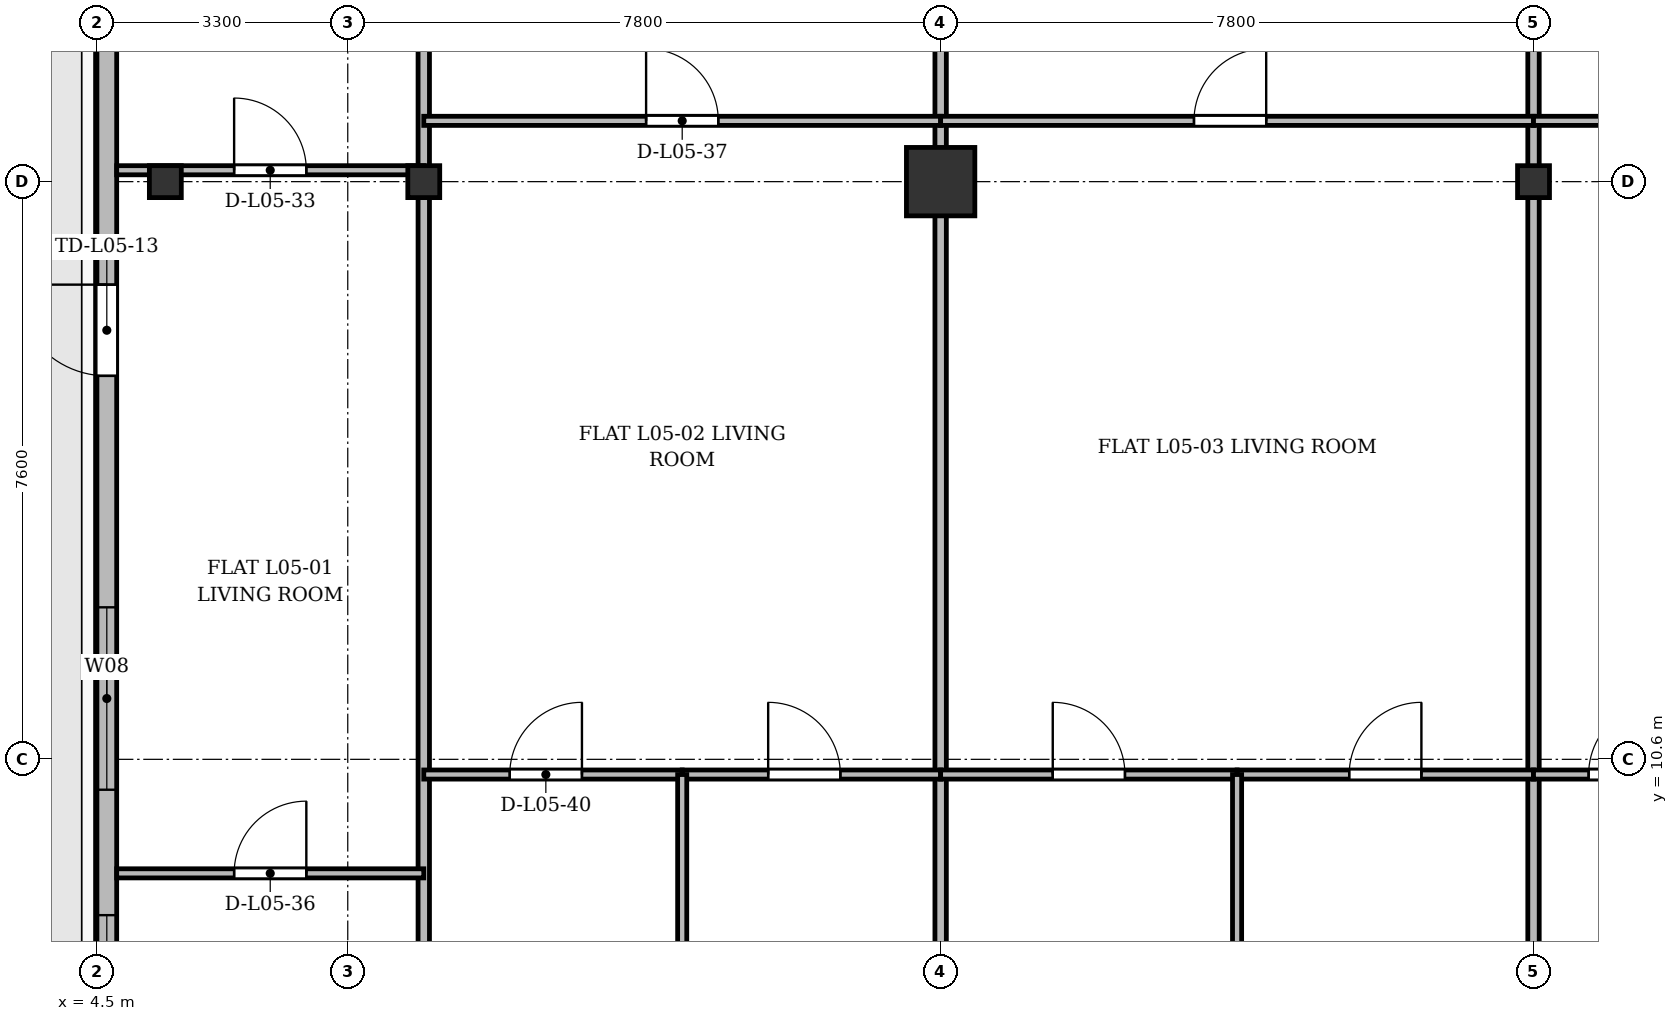
"""IFC4 building model, lengths in metres.
Left out: names, types, materials, properties, quantities, classifications, styles, units other than length and angle.
Written with IfcOpenShell. Run it as: python <this file> out.ifc"""

import sys

from ifc_helpers import new_model, si_unit, direction, frame, frame_2d, origin, origin_2d, place, context, subcontext, project, spatial, rectangle, i_section, extrude, source, transform, mapped, element, fill, save


model = new_model("IFC4")
c1 = context("Model", 3, precision=1e-05, world=origin(), true_north=direction((0.0, 1.0)))
c2 = subcontext(c1, "Body", "Model", "MODEL_VIEW")
j1 = project(units=[si_unit("LENGTHUNIT", "METRE"), si_unit("PLANEANGLEUNIT", "RADIAN")], contexts=[c1])
p1 = place(None, origin())
s1 = spatial("IfcSite", under=j1, at=p1, CompositionType="ELEMENT")
p2 = place(p1, origin())
s2 = spatial("IfcBuilding", under=s1, at=p2, CompositionType="ELEMENT")
p3 = place(p2, frame((0.0, 0.0, 23.5)))
s3 = spatial("IfcBuildingStorey", under=s2, at=p3, CompositionType="ELEMENT", Elevation=23.5)
m1 = source(origin(), c2, "Body", "SweptSolid", [
    extrude(i_section(OverallWidth=0.42, OverallDepth=0.42, WebThickness=0.026, FlangeThickness=0.04, at=origin_2d()), origin(), (0.0, 0.0, 1.0), 3.6),
])
for number, where, z_axis, x_axis in (
    (1, (5.4, 18.2, 0.0), (0.0, 0.0, 1.0), (1.0, 0.0, 0.0)),
    (2, (8.8, 18.2, 0.0), (0.0, 0.0, 1.0), (1.0, 0.0, 0.0)),
):
    element("IfcColumn", number, at=place(p3, frame(where, z_axis=z_axis, x_axis=x_axis)), inside=s3, PredefinedType="COLUMN", context=c2, shape_type="MappedRepresentation", body=[
        mapped(m1, transform((0.0, 0.0, 0.0), x_axis=(1.0, 0.0, 0.0), y_axis=(0.0, 1.0, 0.0), z_axis=(0.0, 0.0, 1.0), scale=1.0)),
    ])
m2 = source(origin(), c2, "Body", "SweptSolid", [
    extrude(rectangle(XDim=0.9, YDim=0.9, at=origin_2d()), origin(), (0.0, 0.0, 1.0), 3.6),
])
p4 = place(p3, frame((15.6, 18.2, 0.0), z_axis=(0.0, 0.0, 1.0), x_axis=(1.0, 0.0, 0.0)))
e3 = element("IfcColumn", 3, at=p4, inside=s3, PredefinedType="COLUMN", context=c2, shape_type="MappedRepresentation", body=[
    mapped(m2, transform((0.0, 0.0, 0.0), x_axis=(1.0, 0.0, 0.0), y_axis=(0.0, 1.0, 0.0), z_axis=(0.0, 0.0, 1.0), scale=1.0)),
])
p5 = place(p3, frame((23.4, 18.2, 0.0), z_axis=(0.0, 0.0, 1.0), x_axis=(1.0, 0.0, 0.0)))
e4 = element("IfcColumn", 4, at=p5, inside=s3, PredefinedType="COLUMN", context=c2, shape_type="MappedRepresentation", body=[
    mapped(m1, transform((0.0, 0.0, 0.0), x_axis=(1.0, 0.0, 0.0), y_axis=(0.0, 1.0, 0.0), z_axis=(0.0, 0.0, 1.0), scale=1.0)),
])
p6 = place(p3, frame((4.63, 5.9, 0.0), z_axis=(0.0, 0.0, 1.0), x_axis=(0.0, 1.0, 0.0)))
e5 = element("IfcWall", 5, at=p6, inside=s3, PredefinedType="SOLIDWALL", context=c2, shape_type="SweptSolid", body=[
    extrude(rectangle(XDim=39.6, YDim=0.26, at=frame_2d((19.8, 0.0))), origin(), (0.0, 0.0, 1.0), 3.34),
])
p7 = place(p6, frame((9.745, 0.0, 0.0)))
e6 = element("IfcOpeningElement", 6, at=p7, cuts=e5, PredefinedType="OPENING", context=c2, shape_type="SweptSolid", body=[
    extrude(rectangle(XDim=1.2, YDim=2.2, at=frame_2d((0.6, 1.1))), frame((0.0, 0.14, 0.0), z_axis=(0.0, -1.0, 0.0), x_axis=(1.0, 0.0, 0.0)), (0.0, 0.0, 1.0), 0.28),
])
p8 = place(p6, frame((1.45, 0.0, 0.92)))
e7 = element("IfcOpeningElement", 7, at=p8, cuts=e5, PredefinedType="OPENING", context=c2, shape_type="SweptSolid", body=[
    extrude(rectangle(XDim=1.2, YDim=1.65, at=frame_2d((0.6, 0.825))), frame((0.0, 0.14, 0.0), z_axis=(0.0, -1.0, 0.0), x_axis=(1.0, 0.0, 0.0)), (0.0, 0.0, 1.0), 0.28),
])
p9 = place(p6, frame((4.3, 0.0, 0.92)))
e8 = element("IfcOpeningElement", 8, at=p9, cuts=e5, PredefinedType="OPENING", context=c2, shape_type="SweptSolid", body=[
    extrude(rectangle(XDim=2.4, YDim=2.1, at=frame_2d((1.2, 1.05))), frame((0.0, 0.14, 0.0), z_axis=(0.0, -1.0, 0.0), x_axis=(1.0, 0.0, 0.0)), (0.0, 0.0, 1.0), 0.28),
])
p10 = place(p6, frame((33.9, 0.0, 0.92)))
e9 = element("IfcOpeningElement", 9, at=p10, cuts=e5, PredefinedType="OPENING", context=c2, shape_type="SweptSolid", body=[
    extrude(rectangle(XDim=1.2, YDim=1.65, at=frame_2d((0.6, 0.825))), frame((0.0, 0.14, 0.0), z_axis=(0.0, -1.0, 0.0), x_axis=(1.0, 0.0, 0.0)), (0.0, 0.0, 1.0), 0.28),
])
p11 = place(p6, frame((37.25, 0.0, 0.92)))
e10 = element("IfcOpeningElement", 10, at=p11, cuts=e5, PredefinedType="OPENING", context=c2, shape_type="SweptSolid", body=[
    extrude(rectangle(XDim=1.2, YDim=1.65, at=frame_2d((0.6, 0.825))), frame((0.0, 0.14, 0.0), z_axis=(0.0, -1.0, 0.0), x_axis=(1.0, 0.0, 0.0)), (0.0, 0.0, 1.0), 0.28),
])
for number, where, z_axis, x_axis in (
    (11, (8.8, 3.145, 0.0), (0.0, 0.0, 1.0), (0.0, 1.0, 0.0)),
    (12, (15.6, 3.145, 0.0), (0.0, 0.0, 1.0), (0.0, 1.0, 0.0)),
    (13, (23.4, 3.145, 0.0), (0.0, 0.0, 1.0), (0.0, 1.0, 0.0)),
):
    element("IfcWall", number, at=place(p3, frame(where, z_axis=z_axis, x_axis=x_axis)), inside=s3, PredefinedType="PARTITIONING", context=c2, shape_type="SweptSolid", body=[
        extrude(rectangle(XDim=24.455, YDim=0.15, at=frame_2d((12.228, 0.0))), origin(), (0.0, 0.0, 1.0), 2.752),
    ])
p12 = place(p3, frame((4.76, 18.35, 0.0), z_axis=(0.0, 0.0, 1.0), x_axis=(1.0, 0.0, 0.0)))
e14 = element("IfcWall", 14, at=p12, inside=s3, PredefinedType="PARTITIONING", context=c2, shape_type="SweptSolid", body=[
    extrude(rectangle(XDim=4.04, YDim=0.12, at=frame_2d((2.02, 0.0))), origin(), (0.0, 0.0, 1.0), 2.69),
])
p13 = place(p12, frame((1.545, 0.0, 0.0)))
e15 = element("IfcOpeningElement", 15, at=p13, cuts=e14, PredefinedType="OPENING", context=c2, shape_type="SweptSolid", body=[
    extrude(rectangle(XDim=0.95, YDim=2.15, at=frame_2d((0.475, 1.075))), frame((0.0, 0.07, 0.0), z_axis=(0.0, -1.0, 0.0), x_axis=(1.0, 0.0, 0.0)), (0.0, 0.0, 1.0), 0.14),
])
p14 = place(p3, frame((4.76, 9.1, 0.0), z_axis=(0.0, 0.0, 1.0), x_axis=(1.0, 0.0, 0.0)))
e16 = element("IfcWall", 16, at=p14, inside=s3, PredefinedType="PARTITIONING", context=c2, shape_type="SweptSolid", body=[
    extrude(rectangle(XDim=4.04, YDim=0.12, at=frame_2d((2.02, 0.0))), origin(), (0.0, 0.0, 1.0), 2.752),
])
p15 = place(p14, frame((1.545, 0.0, 0.0)))
e17 = element("IfcOpeningElement", 17, at=p15, cuts=e16, PredefinedType="OPENING", context=c2, shape_type="SweptSolid", body=[
    extrude(rectangle(XDim=0.95, YDim=2.15, at=frame_2d((0.475, 1.075))), frame((0.0, 0.07, 0.0), z_axis=(0.0, -1.0, 0.0), x_axis=(1.0, 0.0, 0.0)), (0.0, 0.0, 1.0), 0.14),
])
p16 = place(p3, frame((8.8, 19.0, 0.0), z_axis=(0.0, 0.0, 1.0), x_axis=(1.0, 0.0, 0.0)))
e18 = element("IfcWall", 18, at=p16, inside=s3, PredefinedType="PARTITIONING", context=c2, shape_type="SweptSolid", body=[
    extrude(rectangle(XDim=6.8, YDim=0.12, at=frame_2d((3.4, 0.0))), origin(), (0.0, 0.0, 1.0), 2.752),
])
p17 = place(p16, frame((2.925, 0.0, 0.0)))
e19 = element("IfcOpeningElement", 19, at=p17, cuts=e18, PredefinedType="OPENING", context=c2, shape_type="SweptSolid", body=[
    extrude(rectangle(XDim=0.95, YDim=2.15, at=frame_2d((0.475, 1.075))), frame((0.0, 0.07, 0.0), z_axis=(0.0, -1.0, 0.0), x_axis=(1.0, 0.0, 0.0)), (0.0, 0.0, 1.0), 0.14),
])
p18 = place(p3, frame((8.8, 10.4, 0.0), z_axis=(0.0, 0.0, 1.0), x_axis=(1.0, 0.0, 0.0)))
e20 = element("IfcWall", 20, at=p18, inside=s3, PredefinedType="PARTITIONING", context=c2, shape_type="SweptSolid", body=[
    extrude(rectangle(XDim=3.4, YDim=0.12, at=frame_2d((1.7, 0.0))), origin(), (0.0, 0.0, 1.0), 2.752),
])
p19 = place(p18, frame((1.131, 0.0, 0.0)))
e21 = element("IfcOpeningElement", 21, at=p19, cuts=e20, PredefinedType="OPENING", context=c2, shape_type="SweptSolid", body=[
    extrude(rectangle(XDim=0.95, YDim=2.15, at=frame_2d((0.475, 1.075))), frame((0.0, 0.07, 0.0), z_axis=(0.0, -1.0, 0.0), x_axis=(1.0, 0.0, 0.0)), (0.0, 0.0, 1.0), 0.14),
])
p20 = place(p3, frame((12.2, 10.4, 0.0), z_axis=(0.0, 0.0, 1.0), x_axis=(1.0, 0.0, 0.0)))
e22 = element("IfcWall", 22, at=p20, inside=s3, PredefinedType="PARTITIONING", context=c2, shape_type="SweptSolid", body=[
    extrude(rectangle(XDim=3.4, YDim=0.12, at=frame_2d((1.7, 0.0))), origin(), (0.0, 0.0, 1.0), 2.752),
])
p21 = place(p20, frame((1.131, 0.0, 0.0)))
e23 = element("IfcOpeningElement", 23, at=p21, cuts=e22, PredefinedType="OPENING", context=c2, shape_type="SweptSolid", body=[
    extrude(rectangle(XDim=0.95, YDim=2.15, at=frame_2d((0.475, 1.075))), frame((0.0, 0.07, 0.0), z_axis=(0.0, -1.0, 0.0), x_axis=(1.0, 0.0, 0.0)), (0.0, 0.0, 1.0), 0.14),
])
p22 = place(p3, frame((12.2, 3.145, 0.0), z_axis=(0.0, 0.0, 1.0), x_axis=(0.0, 1.0, 0.0)))
e24 = element("IfcWall", 24, at=p22, inside=s3, PredefinedType="PARTITIONING", context=c2, shape_type="SweptSolid", body=[
    extrude(rectangle(XDim=7.255, YDim=0.12, at=frame_2d((3.627, 0.0))), origin(), (0.0, 0.0, 1.0), 2.69),
])
p23 = place(p3, frame((15.6, 19.0, 0.0), z_axis=(0.0, 0.0, 1.0), x_axis=(1.0, 0.0, 0.0)))
e25 = element("IfcWall", 25, at=p23, inside=s3, PredefinedType="PARTITIONING", context=c2, shape_type="SweptSolid", body=[
    extrude(rectangle(XDim=7.8, YDim=0.12, at=frame_2d((3.9, 0.0))), origin(), (0.0, 0.0, 1.0), 2.752),
])
p24 = place(p23, frame((3.333, 0.0, 0.0)))
e26 = element("IfcOpeningElement", 26, at=p24, cuts=e25, PredefinedType="OPENING", context=c2, shape_type="SweptSolid", body=[
    extrude(rectangle(XDim=0.95, YDim=2.15, at=frame_2d((0.475, 1.075))), frame((0.0, 0.07, 0.0), z_axis=(0.0, -1.0, 0.0), x_axis=(1.0, 0.0, 0.0)), (0.0, 0.0, 1.0), 0.14),
])
p25 = place(p3, frame((15.6, 10.4, 0.0), z_axis=(0.0, 0.0, 1.0), x_axis=(1.0, 0.0, 0.0)))
e27 = element("IfcWall", 27, at=p25, inside=s3, PredefinedType="PARTITIONING", context=c2, shape_type="SweptSolid", body=[
    extrude(rectangle(XDim=3.9, YDim=0.12, at=frame_2d((1.95, 0.0))), origin(), (0.0, 0.0, 1.0), 2.752),
])
p26 = place(p25, frame((1.475, 0.0, 0.0)))
e28 = element("IfcOpeningElement", 28, at=p26, cuts=e27, PredefinedType="OPENING", context=c2, shape_type="SweptSolid", body=[
    extrude(rectangle(XDim=0.95, YDim=2.15, at=frame_2d((0.475, 1.075))), frame((0.0, 0.07, 0.0), z_axis=(0.0, -1.0, 0.0), x_axis=(1.0, 0.0, 0.0)), (0.0, 0.0, 1.0), 0.14),
])
p27 = place(p3, frame((19.5, 10.4, 0.0), z_axis=(0.0, 0.0, 1.0), x_axis=(1.0, 0.0, 0.0)))
e29 = element("IfcWall", 29, at=p27, inside=s3, PredefinedType="PARTITIONING", context=c2, shape_type="SweptSolid", body=[
    extrude(rectangle(XDim=3.9, YDim=0.12, at=frame_2d((1.95, 0.0))), origin(), (0.0, 0.0, 1.0), 2.752),
])
p28 = place(p27, frame((1.475, 0.0, 0.0)))
e30 = element("IfcOpeningElement", 30, at=p28, cuts=e29, PredefinedType="OPENING", context=c2, shape_type="SweptSolid", body=[
    extrude(rectangle(XDim=0.95, YDim=2.15, at=frame_2d((0.475, 1.075))), frame((0.0, 0.07, 0.0), z_axis=(0.0, -1.0, 0.0), x_axis=(1.0, 0.0, 0.0)), (0.0, 0.0, 1.0), 0.14),
])
p29 = place(p3, frame((19.5, 3.145, 0.0), z_axis=(0.0, 0.0, 1.0), x_axis=(0.0, 1.0, 0.0)))
e31 = element("IfcWall", 31, at=p29, inside=s3, PredefinedType="PARTITIONING", context=c2, shape_type="SweptSolid", body=[
    extrude(rectangle(XDim=7.255, YDim=0.12, at=frame_2d((3.627, 0.0))), origin(), (0.0, 0.0, 1.0), 2.69),
])
p30 = place(p3, frame((23.4, 19.0, 0.0), z_axis=(0.0, 0.0, 1.0), x_axis=(1.0, 0.0, 0.0)))
e32 = element("IfcWall", 32, at=p30, inside=s3, PredefinedType="PARTITIONING", context=c2, shape_type="SweptSolid", body=[
    extrude(rectangle(XDim=7.2, YDim=0.12, at=frame_2d((3.6, 0.0))), origin(), (0.0, 0.0, 1.0), 2.752),
])
p31 = place(p30, frame((3.125, 0.0, 0.0)))
e33 = element("IfcOpeningElement", 33, at=p31, cuts=e32, PredefinedType="OPENING", context=c2, shape_type="SweptSolid", body=[
    extrude(rectangle(XDim=0.95, YDim=2.15, at=frame_2d((0.475, 1.075))), frame((0.0, 0.07, 0.0), z_axis=(0.0, -1.0, 0.0), x_axis=(1.0, 0.0, 0.0)), (0.0, 0.0, 1.0), 0.14),
])
p32 = place(p3, frame((23.4, 10.4, 0.0), z_axis=(0.0, 0.0, 1.0), x_axis=(1.0, 0.0, 0.0)))
e34 = element("IfcWall", 34, at=p32, inside=s3, PredefinedType="PARTITIONING", context=c2, shape_type="SweptSolid", body=[
    extrude(rectangle(XDim=2.4, YDim=0.12, at=frame_2d((1.2, 0.0))), origin(), (0.0, 0.0, 1.0), 2.752),
])
p33 = place(p32, frame((0.725, 0.0, 0.0)))
e35 = element("IfcOpeningElement", 35, at=p33, cuts=e34, PredefinedType="OPENING", context=c2, shape_type="SweptSolid", body=[
    extrude(rectangle(XDim=0.95, YDim=2.15, at=frame_2d((0.475, 1.075))), frame((0.0, 0.07, 0.0), z_axis=(0.0, -1.0, 0.0), x_axis=(1.0, 0.0, 0.0)), (0.0, 0.0, 1.0), 0.14),
])
m3 = source(origin(), c2, "Body", "SweptSolid", [
    extrude(rectangle(XDim=1.2, YDim=2.2, at=frame_2d((0.6, 1.1))), frame((0.0, 0.025, 0.0), z_axis=(0.0, -1.0, 0.0), x_axis=(1.0, 0.0, 0.0)), (0.0, 0.0, 1.0), 0.05),
])
p34 = place(p7, origin())
e36 = element("IfcDoor", 36, at=p34, inside=s3, OperationType="SINGLE_SWING_RIGHT", PredefinedType="DOOR", context=c2, shape_type="MappedRepresentation", body=[
    mapped(m3, transform((0.0, 0.0, 0.0), x_axis=(1.0, 0.0, 0.0), y_axis=(0.0, 1.0, 0.0), z_axis=(0.0, 0.0, 1.0), scale=1.0)),
])
fill(e6, e36)
m4 = source(origin(), c2, "Body", "SweptSolid", [
    extrude(rectangle(XDim=1.2, YDim=1.65, at=frame_2d((0.6, 0.825))), frame((0.0, 0.03, 0.0), z_axis=(0.0, -1.0, 0.0), x_axis=(1.0, 0.0, 0.0)), (0.0, 0.0, 1.0), 0.06),
])
p35 = place(p8, origin())
e37 = element("IfcWindow", 37, at=p35, inside=s3, PartitioningType="SINGLE_PANEL", PredefinedType="WINDOW", context=c2, shape_type="MappedRepresentation", body=[
    mapped(m4, transform((0.0, 0.0, 0.0), x_axis=(1.0, 0.0, 0.0), y_axis=(0.0, 1.0, 0.0), z_axis=(0.0, 0.0, 1.0), scale=1.0)),
])
fill(e7, e37)
m5 = source(origin(), c2, "Body", "SweptSolid", [
    extrude(rectangle(XDim=2.4, YDim=2.1, at=frame_2d((1.2, 1.05))), frame((0.0, 0.03, 0.0), z_axis=(0.0, -1.0, 0.0), x_axis=(1.0, 0.0, 0.0)), (0.0, 0.0, 1.0), 0.06),
])
p36 = place(p9, origin())
e38 = element("IfcWindow", 38, at=p36, inside=s3, PartitioningType="SINGLE_PANEL", PredefinedType="WINDOW", context=c2, shape_type="MappedRepresentation", body=[
    mapped(m5, transform((0.0, 0.0, 0.0), x_axis=(1.0, 0.0, 0.0), y_axis=(0.0, 1.0, 0.0), z_axis=(0.0, 0.0, 1.0), scale=1.0)),
])
fill(e8, e38)
m6 = source(origin(), c2, "Body", "SweptSolid", [
    extrude(rectangle(XDim=0.95, YDim=2.15, at=frame_2d((0.475, 1.075))), frame((0.0, 0.025, 0.0), z_axis=(0.0, -1.0, 0.0), x_axis=(1.0, 0.0, 0.0)), (0.0, 0.0, 1.0), 0.05),
])
p37 = place(p13, origin())
e39 = element("IfcDoor", 39, at=p37, inside=s3, OperationType="SINGLE_SWING_LEFT", PredefinedType="DOOR", context=c2, shape_type="MappedRepresentation", body=[
    mapped(m6, transform((0.0, 0.0, 0.0), x_axis=(1.0, 0.0, 0.0), y_axis=(0.0, 1.0, 0.0), z_axis=(0.0, 0.0, 1.0), scale=1.0)),
])
fill(e15, e39)
p38 = place(p15, origin())
e40 = element("IfcDoor", 40, at=p38, inside=s3, OperationType="SINGLE_SWING_RIGHT", PredefinedType="DOOR", context=c2, shape_type="MappedRepresentation", body=[
    mapped(m6, transform((0.0, 0.0, 0.0), x_axis=(1.0, 0.0, 0.0), y_axis=(0.0, 1.0, 0.0), z_axis=(0.0, 0.0, 1.0), scale=1.0)),
])
fill(e17, e40)
p39 = place(p17, origin())
e41 = element("IfcDoor", 41, at=p39, inside=s3, OperationType="SINGLE_SWING_LEFT", PredefinedType="DOOR", context=c2, shape_type="MappedRepresentation", body=[
    mapped(m6, transform((0.0, 0.0, 0.0), x_axis=(1.0, 0.0, 0.0), y_axis=(0.0, 1.0, 0.0), z_axis=(0.0, 0.0, 1.0), scale=1.0)),
])
fill(e19, e41)
p40 = place(p19, origin())
e42 = element("IfcDoor", 42, at=p40, inside=s3, OperationType="SINGLE_SWING_RIGHT", PredefinedType="DOOR", context=c2, shape_type="MappedRepresentation", body=[
    mapped(m6, transform((0.0, 0.0, 0.0), x_axis=(1.0, 0.0, 0.0), y_axis=(0.0, 1.0, 0.0), z_axis=(0.0, 0.0, 1.0), scale=1.0)),
])
fill(e21, e42)
p41 = place(p21, origin())
e43 = element("IfcDoor", 43, at=p41, inside=s3, OperationType="SINGLE_SWING_LEFT", PredefinedType="DOOR", context=c2, shape_type="MappedRepresentation", body=[
    mapped(m6, transform((0.0, 0.0, 0.0), x_axis=(1.0, 0.0, 0.0), y_axis=(0.0, 1.0, 0.0), z_axis=(0.0, 0.0, 1.0), scale=1.0)),
])
fill(e23, e43)
p42 = place(p24, origin())
e44 = element("IfcDoor", 44, at=p42, inside=s3, OperationType="SINGLE_SWING_RIGHT", PredefinedType="DOOR", context=c2, shape_type="MappedRepresentation", body=[
    mapped(m6, transform((0.0, 0.0, 0.0), x_axis=(1.0, 0.0, 0.0), y_axis=(0.0, 1.0, 0.0), z_axis=(0.0, 0.0, 1.0), scale=1.0)),
])
fill(e26, e44)
p43 = place(p26, origin())
e45 = element("IfcDoor", 45, at=p43, inside=s3, OperationType="SINGLE_SWING_LEFT", PredefinedType="DOOR", context=c2, shape_type="MappedRepresentation", body=[
    mapped(m6, transform((0.0, 0.0, 0.0), x_axis=(1.0, 0.0, 0.0), y_axis=(0.0, 1.0, 0.0), z_axis=(0.0, 0.0, 1.0), scale=1.0)),
])
fill(e28, e45)
p44 = place(p28, origin())
e46 = element("IfcDoor", 46, at=p44, inside=s3, OperationType="SINGLE_SWING_RIGHT", PredefinedType="DOOR", context=c2, shape_type="MappedRepresentation", body=[
    mapped(m6, transform((0.0, 0.0, 0.0), x_axis=(1.0, 0.0, 0.0), y_axis=(0.0, 1.0, 0.0), z_axis=(0.0, 0.0, 1.0), scale=1.0)),
])
fill(e30, e46)
p45 = place(p33, origin())
e47 = element("IfcDoor", 47, at=p45, inside=s3, OperationType="SINGLE_SWING_RIGHT", PredefinedType="DOOR", context=c2, shape_type="MappedRepresentation", body=[
    mapped(m6, transform((0.0, 0.0, 0.0), x_axis=(1.0, 0.0, 0.0), y_axis=(0.0, 1.0, 0.0), z_axis=(0.0, 0.0, 1.0), scale=1.0)),
])
fill(e35, e47)
save(model, sys.argv[1])
